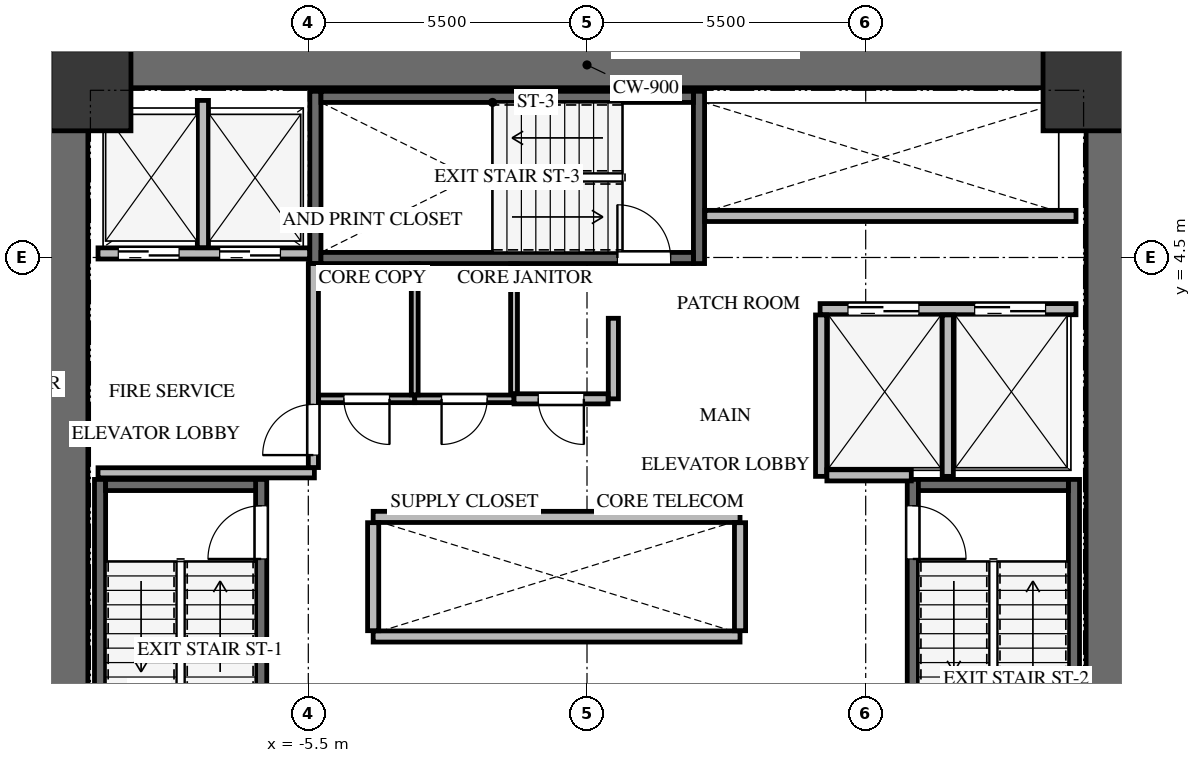
"""IFC4 building model, lengths in metres.
Left out: names, types, materials, properties, quantities, classifications, styles, units other than length and angle.
Written with IfcOpenShell. Run it as: python <this file> out.ifc"""

import sys

from ifc_helpers import new_model, si_unit, direction, frame, frame_2d, origin, origin_2d, place, context, subcontext, project, spatial, rectangle, extrude, source, transform, mapped, element, fill, save


model = new_model("IFC4")
c1 = context("Model", 3, precision=1e-05, world=origin(), true_north=direction((0.0, 1.0)))
c2 = subcontext(c1, "Body", "Model", "MODEL_VIEW")
j1 = project(units=[si_unit("LENGTHUNIT", "METRE"), si_unit("PLANEANGLEUNIT", "RADIAN")], contexts=[c1])
p1 = place(None, origin())
s1 = spatial("IfcSite", under=j1, at=p1, CompositionType="ELEMENT")
p2 = place(p1, origin())
s2 = spatial("IfcBuilding", under=s1, at=p2, CompositionType="ELEMENT")
p3 = place(p2, frame((0.0, 0.0, 39.0)))
s3 = spatial("IfcBuildingStorey", under=s2, at=p3, CompositionType="ELEMENT", Elevation=39.0)
for number, where, z_axis, x_axis in (
    (1, (-10.3, -8.75, 0.0), (0.0, 0.0, 1.0), (0.0, 1.0, 0.0)),
    (2, (10.3, -8.75, 0.0), (0.0, 0.0, 1.0), (0.0, 1.0, 0.0)),
):
    element("IfcWall", number, at=place(p3, frame(where, z_axis=z_axis, x_axis=x_axis)), inside=s3, PredefinedType="SHEAR", context=c2, shape_type="SweptSolid", body=[
        extrude(rectangle(XDim=17.5, YDim=0.9, at=frame_2d((8.75, 0.0))), origin(), (0.0, 0.0, 1.0), 3.3),
    ])
p4 = place(p3, frame((-9.85, 8.3, 0.0), z_axis=(0.0, 0.0, 1.0), x_axis=(1.0, 0.0, 0.0)))
e3 = element("IfcWall", 3, at=p4, inside=s3, PredefinedType="SHEAR", context=c2, shape_type="SweptSolid", body=[
    extrude(rectangle(XDim=19.7, YDim=0.9, at=frame_2d((9.85, 0.0))), origin(), (0.0, 0.0, 1.0), 3.3),
])
p5 = place(p3, frame((-6.43, -7.77, -0.24), z_axis=(0.0, 0.0, 1.0), x_axis=(0.0, 1.0, 0.0)))
e4 = element("IfcWall", 4, at=p5, inside=s3, PredefinedType="SHEAR", context=c2, shape_type="SweptSolid", body=[
    extrude(rectangle(XDim=7.89, YDim=0.22, at=frame_2d((3.945, 0.0))), origin(), (0.0, 0.0, 1.0), 3.3),
])
p6 = place(p5, frame((6.32, 0.0, 0.0)))
e5 = element("IfcOpeningElement", 5, at=p6, cuts=e4, PredefinedType="OPENING", context=c2, shape_type="SweptSolid", body=[
    extrude(rectangle(XDim=1.05, YDim=2.15, at=frame_2d((0.525, 1.075))), frame((0.0, 0.12, 0.0), z_axis=(0.0, -1.0, 0.0), x_axis=(1.0, 0.0, 0.0)), (0.0, 0.0, 1.0), 0.24),
])
p7 = place(p3, frame((-9.61, 0.12, -0.24), z_axis=(0.0, 0.0, 1.0), x_axis=(0.0, -1.0, 0.0)))
e6 = element("IfcWall", 6, at=p7, inside=s3, PredefinedType="SHEAR", context=c2, shape_type="SweptSolid", body=[
    extrude(rectangle(XDim=7.89, YDim=0.22, at=frame_2d((3.945, 0.0))), origin(), (0.0, 0.0, 1.0), 3.3),
])
p8 = place(p3, frame((-6.54, 0.01, -0.24), z_axis=(0.0, 0.0, 1.0), x_axis=(-1.0, 0.0, 0.0)))
e7 = element("IfcWall", 7, at=p8, inside=s3, PredefinedType="SHEAR", context=c2, shape_type="SweptSolid", body=[
    extrude(rectangle(XDim=2.96, YDim=0.22, at=frame_2d((1.48, 0.0))), origin(), (0.0, 0.0, 1.0), 3.3),
])
p9 = place(p3, frame((9.61, -7.77, -0.24), z_axis=(0.0, 0.0, 1.0), x_axis=(0.0, 1.0, 0.0)))
e8 = element("IfcWall", 8, at=p9, inside=s3, PredefinedType="SHEAR", context=c2, shape_type="SweptSolid", body=[
    extrude(rectangle(XDim=7.89, YDim=0.22, at=frame_2d((3.945, 0.0))), origin(), (0.0, 0.0, 1.0), 3.3),
])
p10 = place(p3, frame((6.43, 0.12, -0.24), z_axis=(0.0, 0.0, 1.0), x_axis=(0.0, -1.0, 0.0)))
e9 = element("IfcWall", 9, at=p10, inside=s3, PredefinedType="SHEAR", context=c2, shape_type="SweptSolid", body=[
    extrude(rectangle(XDim=7.89, YDim=0.22, at=frame_2d((3.945, 0.0))), origin(), (0.0, 0.0, 1.0), 3.3),
])
p11 = place(p10, frame((0.52, 0.0, 0.0)))
e10 = element("IfcOpeningElement", 10, at=p11, cuts=e9, PredefinedType="OPENING", context=c2, shape_type="SweptSolid", body=[
    extrude(rectangle(XDim=1.05, YDim=2.15, at=frame_2d((0.525, 1.075))), frame((0.0, 0.12, 0.0), z_axis=(0.0, -1.0, 0.0), x_axis=(1.0, 0.0, 0.0)), (0.0, 0.0, 1.0), 0.24),
])
p12 = place(p3, frame((9.5, 0.01, -0.24), z_axis=(0.0, 0.0, 1.0), x_axis=(-1.0, 0.0, 0.0)))
e11 = element("IfcWall", 11, at=p12, inside=s3, PredefinedType="SHEAR", context=c2, shape_type="SweptSolid", body=[
    extrude(rectangle(XDim=2.96, YDim=0.22, at=frame_2d((1.48, 0.0))), origin(), (0.0, 0.0, 1.0), 3.3),
])
for number, where, z_axis, x_axis in (
    (12, (2.21, 4.38, -0.24), (0.0, 0.0, 1.0), (0.0, 1.0, 0.0)),
    (13, (-5.36, 7.78, -0.24), (0.0, 0.0, 1.0), (0.0, -1.0, 0.0)),
):
    element("IfcWall", number, at=place(p3, frame(where, z_axis=z_axis, x_axis=x_axis)), inside=s3, PredefinedType="SHEAR", context=c2, shape_type="SweptSolid", body=[
        extrude(rectangle(XDim=3.4, YDim=0.22, at=frame_2d((1.7, 0.0))), origin(), (0.0, 0.0, 1.0), 3.3),
    ])
p13 = place(p3, frame((-5.25, 4.49, -0.24), z_axis=(0.0, 0.0, 1.0), x_axis=(1.0, 0.0, 0.0)))
e14 = element("IfcWall", 14, at=p13, inside=s3, PredefinedType="SHEAR", context=c2, shape_type="SweptSolid", body=[
    extrude(rectangle(XDim=7.35, YDim=0.22, at=frame_2d((3.675, 0.0))), origin(), (0.0, 0.0, 1.0), 3.3),
])
p14 = place(p13, frame((5.85, 0.0, 0.0)))
e15 = element("IfcOpeningElement", 15, at=p14, cuts=e14, PredefinedType="OPENING", context=c2, shape_type="SweptSolid", body=[
    extrude(rectangle(XDim=1.05, YDim=2.15, at=frame_2d((0.525, 1.075))), frame((0.0, 0.12, 0.0), z_axis=(0.0, -1.0, 0.0), x_axis=(1.0, 0.0, 0.0)), (0.0, 0.0, 1.0), 0.24),
])
p15 = place(p3, frame((2.1, 7.67, -0.24), z_axis=(0.0, 0.0, 1.0), x_axis=(-1.0, 0.0, 0.0)))
e16 = element("IfcWall", 16, at=p15, inside=s3, PredefinedType="SHEAR", context=c2, shape_type="SweptSolid", body=[
    extrude(rectangle(XDim=7.35, YDim=0.22, at=frame_2d((3.675, 0.0))), origin(), (0.0, 0.0, 1.0), 3.3),
])
m1 = source(origin(), c2, "Body", "SweptSolid", [
    extrude(rectangle(XDim=1.6, YDim=1.6, at=origin_2d()), origin(), (0.0, 0.0, 1.0), 3.3),
])
for number, where, z_axis, x_axis in (
    (17, (9.8, 7.8, -0.24), (0.0, 0.0, 1.0), (1.0, 0.0, 0.0)),
    (18, (-9.8, 7.8, -0.24), (0.0, 0.0, 1.0), (1.0, 0.0, 0.0)),
):
    element("IfcColumn", number, at=place(p3, frame(where, z_axis=z_axis, x_axis=x_axis)), inside=s3, PredefinedType="COLUMN", context=c2, shape_type="MappedRepresentation", body=[
        mapped(m1, transform((0.0, 0.0, 0.0), x_axis=(1.0, 0.0, 0.0), y_axis=(0.0, 1.0, 0.0), z_axis=(0.0, 0.0, 1.0), scale=1.0)),
    ])
p16 = place(p3, frame((-9.65, 4.58, 0.0), z_axis=(0.0, 0.0, 1.0), x_axis=(1.0, 0.0, 0.0)))
e19 = element("IfcWall", 19, at=p16, inside=s3, PredefinedType="SOLIDWALL", context=c2, shape_type="SweptSolid", body=[
    extrude(rectangle(XDim=4.175, YDim=0.22, at=frame_2d((2.087, 0.0))), origin(), (0.0, 0.0, 1.0), 3.045),
])
p17 = place(p16, frame((0.4, 0.0, 0.0)))
e20 = element("IfcOpeningElement", 20, at=p17, cuts=e19, PredefinedType="OPENING", context=c2, shape_type="SweptSolid", body=[
    extrude(rectangle(XDim=1.2, YDim=2.15, at=frame_2d((0.6, 1.075))), frame((0.0, 0.12, 0.0), z_axis=(0.0, -1.0, 0.0), x_axis=(1.0, 0.0, 0.0)), (0.0, 0.0, 1.0), 0.24),
])
p18 = place(p16, frame((2.4, 0.0, 0.0)))
e21 = element("IfcOpeningElement", 21, at=p18, cuts=e19, PredefinedType="OPENING", context=c2, shape_type="SweptSolid", body=[
    extrude(rectangle(XDim=1.2, YDim=2.15, at=frame_2d((0.6, 1.075))), frame((0.0, 0.12, 0.0), z_axis=(0.0, -1.0, 0.0), x_axis=(1.0, 0.0, 0.0)), (0.0, 0.0, 1.0), 0.24),
])
p19 = place(p3, frame((-7.58, 4.694, 0.0), z_axis=(0.0, 0.0, 1.0), x_axis=(0.0, 1.0, 0.0)))
e22 = element("IfcWall", 22, at=p19, inside=s3, PredefinedType="SOLIDWALL", context=c2, shape_type="SweptSolid", body=[
    extrude(rectangle(XDim=2.906, YDim=0.22, at=frame_2d((1.453, 0.0))), origin(), (0.0, 0.0, 1.0), 3.045),
])
p20 = place(p3, frame((-9.65, 0.25, 0.0), z_axis=(0.0, 0.0, 1.0), x_axis=(1.0, 0.0, 0.0)))
e23 = element("IfcWall", 23, at=p20, inside=s3, PredefinedType="SOLIDWALL", context=c2, shape_type="SweptSolid", body=[
    extrude(rectangle(XDim=4.27, YDim=0.2, at=frame_2d((2.135, 0.0))), origin(), (0.0, 0.0, 1.0), 3.045),
])
p21 = place(p3, frame((-5.4, 0.354, 0.0), z_axis=(0.0, 0.0, 1.0), x_axis=(0.0, 1.0, 0.0)))
e24 = element("IfcWall", 24, at=p21, inside=s3, PredefinedType="SOLIDWALL", context=c2, shape_type="SweptSolid", body=[
    extrude(rectangle(XDim=4.026, YDim=0.2, at=frame_2d((2.013, 0.0))), origin(), (0.0, 0.0, 1.0), 3.045),
])
p22 = place(p21, frame((0.246, 0.0, 0.0)))
e25 = element("IfcOpeningElement", 25, at=p22, cuts=e24, PredefinedType="OPENING", context=c2, shape_type="SweptSolid", body=[
    extrude(rectangle(XDim=1.0, YDim=2.15, at=frame_2d((0.5, 1.075))), frame((0.0, 0.11, 0.0), z_axis=(0.0, -1.0, 0.0), x_axis=(1.0, 0.0, 0.0)), (0.0, 0.0, 1.0), 0.22),
])
p23 = place(p3, frame((4.6, 3.48, 0.0), z_axis=(0.0, 0.0, 1.0), x_axis=(1.0, 0.0, 0.0)))
e26 = element("IfcWall", 26, at=p23, inside=s3, PredefinedType="SOLIDWALL", context=c2, shape_type="SweptSolid", body=[
    extrude(rectangle(XDim=5.05, YDim=0.22, at=frame_2d((2.525, 0.0))), origin(), (0.0, 0.0, 1.0), 3.045),
])
p24 = place(p23, frame((0.55, 0.0, 0.0)))
e27 = element("IfcOpeningElement", 27, at=p24, cuts=e26, PredefinedType="OPENING", context=c2, shape_type="SweptSolid", body=[
    extrude(rectangle(XDim=1.4, YDim=2.15, at=frame_2d((0.7, 1.075))), frame((0.0, 0.12, 0.0), z_axis=(0.0, -1.0, 0.0), x_axis=(1.0, 0.0, 0.0)), (0.0, 0.0, 1.0), 0.24),
])
p25 = place(p23, frame((3.05, 0.0, 0.0)))
e28 = element("IfcOpeningElement", 28, at=p25, cuts=e26, PredefinedType="OPENING", context=c2, shape_type="SweptSolid", body=[
    extrude(rectangle(XDim=1.4, YDim=2.15, at=frame_2d((0.7, 1.075))), frame((0.0, 0.12, 0.0), z_axis=(0.0, -1.0, 0.0), x_axis=(1.0, 0.0, 0.0)), (0.0, 0.0, 1.0), 0.24),
])
for number, where, z_axis, x_axis in (
    (29, (4.62, 0.18, 0.0), (0.0, 0.0, 1.0), (0.0, 1.0, 0.0)),
    (30, (7.12, 0.18, 0.0), (0.0, 0.0, 1.0), (0.0, 1.0, 0.0)),
):
    element("IfcWall", number, at=place(p3, frame(where, z_axis=z_axis, x_axis=x_axis)), inside=s3, PredefinedType="SOLIDWALL", context=c2, shape_type="SweptSolid", body=[
        extrude(rectangle(XDim=3.186, YDim=0.22, at=frame_2d((1.593, 0.0))), origin(), (0.0, 0.0, 1.0), 3.045),
    ])
p26 = place(p3, frame((4.734, 0.2, 0.0), z_axis=(0.0, 0.0, 1.0), x_axis=(1.0, 0.0, 0.0)))
e31 = element("IfcWall", 31, at=p26, inside=s3, PredefinedType="SOLIDWALL", context=c2, shape_type="SweptSolid", body=[
    extrude(rectangle(XDim=1.666, YDim=0.22, at=frame_2d((0.833, 0.0))), origin(), (0.0, 0.0, 1.0), 3.045),
])
for number, where, z_axis, x_axis in (
    (32, (-4.22, -2.98, 0.0), (0.0, 0.0, 1.0), (1.0, 0.0, 0.0)),
    (33, (-4.22, -0.62, 0.0), (0.0, 0.0, 1.0), (1.0, 0.0, 0.0)),
):
    element("IfcWall", number, at=place(p3, frame(where, z_axis=z_axis, x_axis=x_axis)), inside=s3, PredefinedType="SOLIDWALL", context=c2, shape_type="SweptSolid", body=[
        extrude(rectangle(XDim=7.24, YDim=0.22, at=frame_2d((3.62, 0.0))), origin(), (0.0, 0.0, 1.0), 3.045),
    ])
for number, where, z_axis, x_axis in (
    (34, (-4.22, -2.866, 0.0), (0.0, 0.0, 1.0), (0.0, 1.0, 0.0)),
    (35, (3.02, -2.866, 0.0), (0.0, 0.0, 1.0), (0.0, 1.0, 0.0)),
):
    element("IfcWall", number, at=place(p3, frame(where, z_axis=z_axis, x_axis=x_axis)), inside=s3, PredefinedType="SOLIDWALL", context=c2, shape_type="SweptSolid", body=[
        extrude(rectangle(XDim=2.132, YDim=0.22, at=frame_2d((1.066, 0.0))), origin(), (0.0, 0.0, 1.0), 3.045),
    ])
p27 = place(p3, frame((2.325, 5.32, 0.0), z_axis=(0.0, 0.0, 1.0), x_axis=(1.0, 0.0, 0.0)))
e36 = element("IfcWall", 36, at=p27, inside=s3, PredefinedType="SOLIDWALL", context=c2, shape_type="SweptSolid", body=[
    extrude(rectangle(XDim=7.325, YDim=0.22, at=frame_2d((3.663, 0.0))), origin(), (0.0, 0.0, 1.0), 3.045),
])
p28 = place(p3, frame((-3.4, 1.71, 0.0), z_axis=(0.0, 0.0, 1.0), x_axis=(-1.0, 0.0, 0.0)))
e37 = element("IfcWall", 37, at=p28, inside=s3, PredefinedType="PARTITIONING", context=c2, shape_type="SweptSolid", body=[
    extrude(rectangle(XDim=1.896, YDim=0.15, at=frame_2d((0.948, 0.0))), origin(), (0.0, 0.0, 1.0), 3.045),
])
p29 = place(p28, frame((0.498, 0.0, 0.0)))
e38 = element("IfcOpeningElement", 38, at=p29, cuts=e37, PredefinedType="OPENING", context=c2, shape_type="SweptSolid", body=[
    extrude(rectangle(XDim=0.9, YDim=2.05, at=frame_2d((0.45, 1.025))), frame((0.0, 0.085, 0.0), z_axis=(0.0, -1.0, 0.0), x_axis=(1.0, 0.0, 0.0)), (0.0, 0.0, 1.0), 0.17),
])
p30 = place(p3, frame((-1.44, 1.71, 0.0), z_axis=(0.0, 0.0, 1.0), x_axis=(-1.0, 0.0, 0.0)))
e39 = element("IfcWall", 39, at=p30, inside=s3, PredefinedType="PARTITIONING", context=c2, shape_type="SweptSolid", body=[
    extrude(rectangle(XDim=1.96, YDim=0.15, at=frame_2d((0.98, 0.0))), origin(), (0.0, 0.0, 1.0), 3.045),
])
p31 = place(p30, frame((0.53, 0.0, 0.0)))
e40 = element("IfcOpeningElement", 40, at=p31, cuts=e39, PredefinedType="OPENING", context=c2, shape_type="SweptSolid", body=[
    extrude(rectangle(XDim=0.9, YDim=2.05, at=frame_2d((0.45, 1.025))), frame((0.0, 0.085, 0.0), z_axis=(0.0, -1.0, 0.0), x_axis=(1.0, 0.0, 0.0)), (0.0, 0.0, 1.0), 0.17),
])
p32 = place(p3, frame((0.52, 3.3, 0.0), z_axis=(0.0, 0.0, 1.0), x_axis=(0.0, -1.0, 0.0)))
e41 = element("IfcWall", 41, at=p32, inside=s3, PredefinedType="SOLIDWALL", context=c2, shape_type="SweptSolid", body=[
    extrude(rectangle(XDim=1.59, YDim=0.2, at=frame_2d((0.795, 0.0))), origin(), (0.0, 0.0, 1.0), 3.045),
])
p33 = place(p3, frame((0.416, 1.71, 0.0), z_axis=(0.0, 0.0, 1.0), x_axis=(-1.0, 0.0, 0.0)))
e42 = element("IfcWall", 42, at=p33, inside=s3, PredefinedType="SOLIDWALL", context=c2, shape_type="SweptSolid", body=[
    extrude(rectangle(XDim=1.856, YDim=0.2, at=frame_2d((0.928, 0.0))), origin(), (0.0, 0.0, 1.0), 3.045),
])
p34 = place(p33, frame((0.478, 0.0, 0.0)))
e43 = element("IfcOpeningElement", 43, at=p34, cuts=e42, PredefinedType="OPENING", context=c2, shape_type="SweptSolid", body=[
    extrude(rectangle(XDim=0.9, YDim=2.05, at=frame_2d((0.45, 1.025))), frame((0.0, 0.11, 0.0), z_axis=(0.0, -1.0, 0.0), x_axis=(1.0, 0.0, 0.0)), (0.0, 0.0, 1.0), 0.22),
])
p35 = place(p3, frame((-3.4, 4.375, 0.0), z_axis=(0.0, 0.0, 1.0), x_axis=(0.0, -1.0, 0.0)))
e44 = element("IfcWall", 44, at=p35, inside=s3, PredefinedType="PARTITIONING", context=c2, shape_type="SweptSolid", body=[
    extrude(rectangle(XDim=2.586, YDim=0.135, at=frame_2d((1.293, 0.0))), origin(), (0.0, 0.0, 1.0), 3.045),
])
p36 = place(p3, frame((-1.44, 4.375, 0.0), z_axis=(0.0, 0.0, 1.0), x_axis=(0.0, -1.0, 0.0)))
e45 = element("IfcWall", 45, at=p36, inside=s3, PredefinedType="PARTITIONING", context=c2, shape_type="SweptSolid", body=[
    extrude(rectangle(XDim=2.561, YDim=0.135, at=frame_2d((1.281, 0.0))), origin(), (0.0, 0.0, 1.0), 3.045),
])
m2 = source(origin(), c2, "Body", "SweptSolid", [
    extrude(rectangle(XDim=1.05, YDim=2.15, at=frame_2d((0.525, 1.075))), frame((0.0, 0.025, 0.0), z_axis=(0.0, -1.0, 0.0), x_axis=(1.0, 0.0, 0.0)), (0.0, 0.0, 1.0), 0.05),
])
p37 = place(p6, origin())
e46 = element("IfcDoor", 46, at=p37, inside=s3, OperationType="SINGLE_SWING_LEFT", PredefinedType="DOOR", context=c2, shape_type="MappedRepresentation", body=[
    mapped(m2, transform((0.0, 0.0, 0.0), x_axis=(1.0, 0.0, 0.0), y_axis=(0.0, 1.0, 0.0), z_axis=(0.0, 0.0, 1.0), scale=1.0)),
])
fill(e5, e46)
m3 = source(origin(), c2, "Body", "SweptSolid", [
    extrude(rectangle(XDim=1.05, YDim=2.15, at=frame_2d((0.525, 1.075))), frame((0.0, 0.025, 0.0), z_axis=(0.0, -1.0, 0.0), x_axis=(1.0, 0.0, 0.0)), (0.0, 0.0, 1.0), 0.05),
])
p38 = place(p11, origin())
e47 = element("IfcDoor", 47, at=p38, inside=s3, OperationType="SINGLE_SWING_RIGHT", PredefinedType="DOOR", context=c2, shape_type="MappedRepresentation", body=[
    mapped(m3, transform((0.0, 0.0, 0.0), x_axis=(1.0, 0.0, 0.0), y_axis=(0.0, 1.0, 0.0), z_axis=(0.0, 0.0, 1.0), scale=1.0)),
])
fill(e10, e47)
p39 = place(p14, origin())
e48 = element("IfcDoor", 48, at=p39, inside=s3, OperationType="SINGLE_SWING_LEFT", PredefinedType="DOOR", context=c2, shape_type="MappedRepresentation", body=[
    mapped(m2, transform((0.0, 0.0, 0.0), x_axis=(1.0, 0.0, 0.0), y_axis=(0.0, 1.0, 0.0), z_axis=(0.0, 0.0, 1.0), scale=1.0)),
])
fill(e15, e48)
m4 = source(origin(), c2, "Body", "SweptSolid", [
    extrude(rectangle(XDim=1.2, YDim=2.15, at=frame_2d((0.6, 1.075))), frame((0.0, 0.025, 0.0), z_axis=(0.0, -1.0, 0.0), x_axis=(1.0, 0.0, 0.0)), (0.0, 0.0, 1.0), 0.05),
])
p40 = place(p17, origin())
e49 = element("IfcDoor", 49, at=p40, inside=s3, OperationType="DOUBLE_DOOR_SLIDING", PredefinedType="DOOR", context=c2, shape_type="MappedRepresentation", body=[
    mapped(m4, transform((0.0, 0.0, 0.0), x_axis=(1.0, 0.0, 0.0), y_axis=(0.0, 1.0, 0.0), z_axis=(0.0, 0.0, 1.0), scale=1.0)),
])
fill(e20, e49)
p41 = place(p18, origin())
e50 = element("IfcDoor", 50, at=p41, inside=s3, OperationType="DOUBLE_DOOR_SLIDING", PredefinedType="DOOR", context=c2, shape_type="MappedRepresentation", body=[
    mapped(m4, transform((0.0, 0.0, 0.0), x_axis=(1.0, 0.0, 0.0), y_axis=(0.0, 1.0, 0.0), z_axis=(0.0, 0.0, 1.0), scale=1.0)),
])
fill(e21, e50)
m5 = source(origin(), c2, "Body", "SweptSolid", [
    extrude(rectangle(XDim=1.0, YDim=2.15, at=frame_2d((0.5, 1.075))), frame((0.0, 0.025, 0.0), z_axis=(0.0, -1.0, 0.0), x_axis=(1.0, 0.0, 0.0)), (0.0, 0.0, 1.0), 0.05),
])
p42 = place(p22, origin())
e51 = element("IfcDoor", 51, at=p42, inside=s3, OperationType="SINGLE_SWING_LEFT", PredefinedType="DOOR", context=c2, shape_type="MappedRepresentation", body=[
    mapped(m5, transform((0.0, 0.0, 0.0), x_axis=(1.0, 0.0, 0.0), y_axis=(0.0, 1.0, 0.0), z_axis=(0.0, 0.0, 1.0), scale=1.0)),
])
fill(e25, e51)
m6 = source(origin(), c2, "Body", "SweptSolid", [
    extrude(rectangle(XDim=1.4, YDim=2.15, at=frame_2d((0.7, 1.075))), frame((0.0, 0.025, 0.0), z_axis=(0.0, -1.0, 0.0), x_axis=(1.0, 0.0, 0.0)), (0.0, 0.0, 1.0), 0.05),
])
p43 = place(p24, origin())
e52 = element("IfcDoor", 52, at=p43, inside=s3, OperationType="DOUBLE_DOOR_SLIDING", PredefinedType="DOOR", context=c2, shape_type="MappedRepresentation", body=[
    mapped(m6, transform((0.0, 0.0, 0.0), x_axis=(1.0, 0.0, 0.0), y_axis=(0.0, 1.0, 0.0), z_axis=(0.0, 0.0, 1.0), scale=1.0)),
])
fill(e27, e52)
p44 = place(p25, origin())
e53 = element("IfcDoor", 53, at=p44, inside=s3, OperationType="DOUBLE_DOOR_SLIDING", PredefinedType="DOOR", context=c2, shape_type="MappedRepresentation", body=[
    mapped(m6, transform((0.0, 0.0, 0.0), x_axis=(1.0, 0.0, 0.0), y_axis=(0.0, 1.0, 0.0), z_axis=(0.0, 0.0, 1.0), scale=1.0)),
])
fill(e28, e53)
m7 = source(origin(), c2, "Body", "SweptSolid", [
    extrude(rectangle(XDim=0.9, YDim=2.05, at=frame_2d((0.45, 1.025))), frame((0.0, 0.025, 0.0), z_axis=(0.0, -1.0, 0.0), x_axis=(1.0, 0.0, 0.0)), (0.0, 0.0, 1.0), 0.05),
])
p45 = place(p29, origin())
e54 = element("IfcDoor", 54, at=p45, inside=s3, OperationType="SINGLE_SWING_LEFT", PredefinedType="DOOR", context=c2, shape_type="MappedRepresentation", body=[
    mapped(m7, transform((0.0, 0.0, 0.0), x_axis=(1.0, 0.0, 0.0), y_axis=(0.0, 1.0, 0.0), z_axis=(0.0, 0.0, 1.0), scale=1.0)),
])
fill(e38, e54)
m8 = source(origin(), c2, "Body", "SweptSolid", [
    extrude(rectangle(XDim=0.9, YDim=2.05, at=frame_2d((0.45, 1.025))), frame((0.0, 0.025, 0.0), z_axis=(0.0, -1.0, 0.0), x_axis=(1.0, 0.0, 0.0)), (0.0, 0.0, 1.0), 0.05),
])
p46 = place(p31, origin())
e55 = element("IfcDoor", 55, at=p46, inside=s3, OperationType="SINGLE_SWING_RIGHT", PredefinedType="DOOR", context=c2, shape_type="MappedRepresentation", body=[
    mapped(m8, transform((0.0, 0.0, 0.0), x_axis=(1.0, 0.0, 0.0), y_axis=(0.0, 1.0, 0.0), z_axis=(0.0, 0.0, 1.0), scale=1.0)),
])
fill(e40, e55)
p47 = place(p34, origin())
e56 = element("IfcDoor", 56, at=p47, inside=s3, OperationType="SINGLE_SWING_LEFT", PredefinedType="DOOR", context=c2, shape_type="MappedRepresentation", body=[
    mapped(m7, transform((0.0, 0.0, 0.0), x_axis=(1.0, 0.0, 0.0), y_axis=(0.0, 1.0, 0.0), z_axis=(0.0, 0.0, 1.0), scale=1.0)),
])
fill(e43, e56)
save(model, sys.argv[1])
